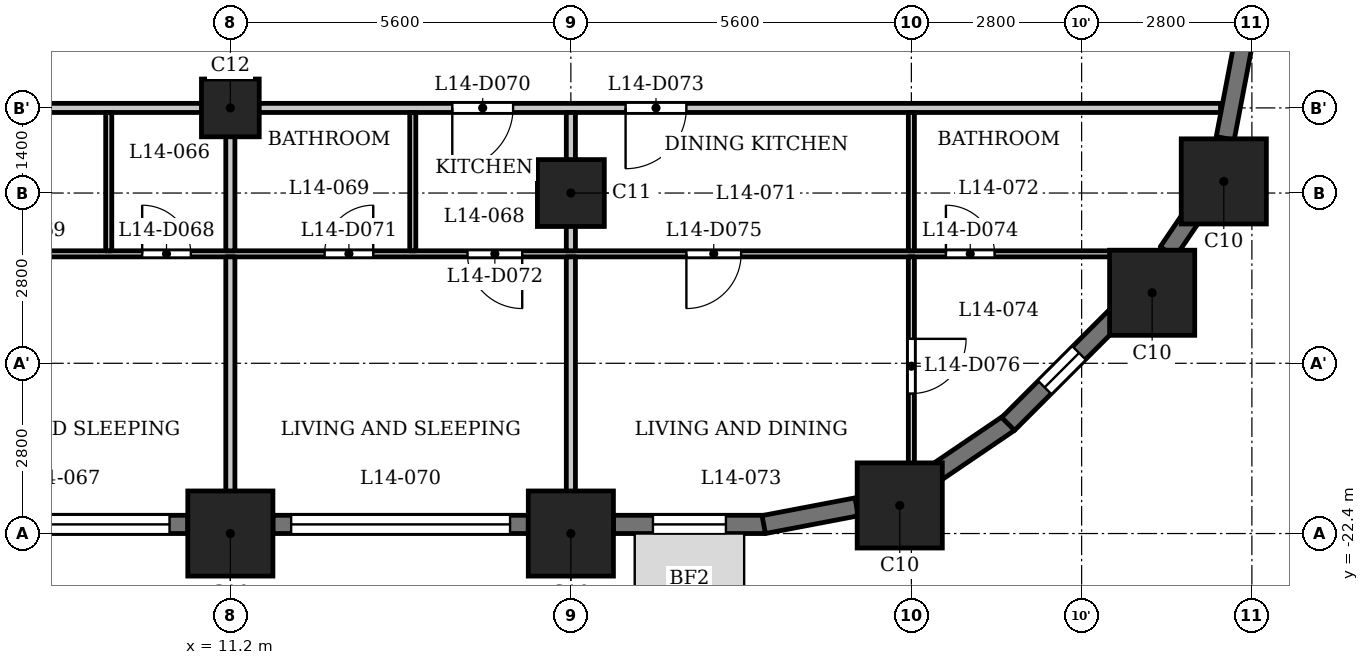
"""IFC4 building model, lengths in metres.
Left out: names, types, materials, properties, quantities, classifications, styles, units other than length and angle.
Written with IfcOpenShell. Run it as: python <this file> out.ifc"""

import sys

from ifc_helpers import new_model, si_unit, direction, frame, frame_2d, origin, origin_2d, place, context, subcontext, project, spatial, rectangle, extrude, element, fill, save


model = new_model("IFC4")
c1 = context("Model", 3, precision=1e-05, world=origin(), true_north=direction((0.0, 1.0)))
c2 = subcontext(c1, "Body", "Model", "MODEL_VIEW")
j1 = project(units=[si_unit("LENGTHUNIT", "METRE"), si_unit("PLANEANGLEUNIT", "RADIAN")], contexts=[c1])
p1 = place(None, origin())
s1 = spatial("IfcSite", under=j1, at=p1, CompositionType="ELEMENT")
p2 = place(p1, origin())
s2 = spatial("IfcBuilding", under=s1, at=p2, CompositionType="ELEMENT")
p3 = place(p2, frame((0.0, 0.0, 58.5)))
s3 = spatial("IfcBuildingStorey", under=s2, at=p3, CompositionType="ELEMENT", Elevation=58.5)
for number, where, z_axis, x_axis in (
    (1, (11.2, -22.4, 0.0), (0.0, 0.0, 1.0), (1.0, 0.0, 0.0)),
    (2, (16.8, -22.4, 0.0), (0.0, 0.0, 1.0), (1.0, 0.0, 0.0)),
    (3, (22.209, -21.938, 0.0), (0.0, 0.0, 1.0), (1.0, 0.0, 0.0)),
    (4, (26.36, -18.44, 0.0), (0.0, 0.0, 1.0), (1.0, 0.0, 0.0)),
    (5, (27.538, -16.609, 0.0), (0.0, 0.0, 1.0), (1.0, 0.0, 0.0)),
):
    element("IfcColumn", number, at=place(p3, frame(where, z_axis=z_axis, x_axis=x_axis)), inside=s3, PredefinedType="COLUMN", context=c2, shape_type="SweptSolid", body=[
        extrude(rectangle(XDim=1.4, YDim=1.4, at=origin_2d()), origin(), (0.0, 0.0, 1.0), 3.5),
    ])
p4 = place(p3, frame((16.8, -16.8, 0.0), z_axis=(0.0, 0.0, 1.0), x_axis=(1.0, 0.0, 0.0)))
e6 = element("IfcColumn", 6, at=p4, inside=s3, PredefinedType="COLUMN", context=c2, shape_type="SweptSolid", body=[
    extrude(rectangle(XDim=1.1, YDim=1.1, at=origin_2d()), origin(), (0.0, 0.0, 1.0), 3.5),
])
p5 = place(p3, frame((11.2, -15.4, 0.0), z_axis=(0.0, 0.0, 1.0), x_axis=(1.0, 0.0, 0.0)))
e7 = element("IfcColumn", 7, at=p5, inside=s3, PredefinedType="COLUMN", context=c2, shape_type="SweptSolid", body=[
    extrude(rectangle(XDim=0.95, YDim=0.95, at=origin_2d()), origin(), (0.0, 0.0, 1.0), 3.5),
])
p6 = place(p3, frame((6.3, -22.25, 0.0), z_axis=(0.0, 0.0, 1.0), x_axis=(1.0, 0.0, 0.0)))
e8 = element("IfcWall", 8, at=p6, inside=s3, PredefinedType="SOLIDWALL", context=c2, shape_type="SweptSolid", body=[
    extrude(rectangle(XDim=4.2, YDim=0.3, at=frame_2d((2.1, 0.0))), origin(), (0.0, 0.0, 1.0), 2.35),
])
p7 = place(p6, frame((0.3, 0.0, 1.2)))
e9 = element("IfcOpeningElement", 9, at=p7, cuts=e8, PredefinedType="OPENING", context=c2, shape_type="SweptSolid", body=[
    extrude(rectangle(XDim=3.6, YDim=0.95, at=frame_2d((1.8, 0.475))), frame((0.0, 0.16, 0.0), z_axis=(0.0, -1.0, 0.0), x_axis=(1.0, 0.0, 0.0)), (0.0, 0.0, 1.0), 0.32),
])
p8 = place(p3, frame((11.9, -22.25, 0.0), z_axis=(0.0, 0.0, 1.0), x_axis=(1.0, 0.0, 0.0)))
e10 = element("IfcWall", 10, at=p8, inside=s3, PredefinedType="SOLIDWALL", context=c2, shape_type="SweptSolid", body=[
    extrude(rectangle(XDim=4.2, YDim=0.3, at=frame_2d((2.1, 0.0))), origin(), (0.0, 0.0, 1.0), 2.35),
])
p9 = place(p8, frame((0.3, 0.0, 1.2)))
e11 = element("IfcOpeningElement", 11, at=p9, cuts=e10, PredefinedType="OPENING", context=c2, shape_type="SweptSolid", body=[
    extrude(rectangle(XDim=3.6, YDim=0.95, at=frame_2d((1.8, 0.475))), frame((0.0, 0.16, 0.0), z_axis=(0.0, -1.0, 0.0), x_axis=(1.0, 0.0, 0.0)), (0.0, 0.0, 1.0), 0.32),
])
p10 = place(p3, frame((17.5, -22.25, 0.0), z_axis=(0.0, 0.0, 1.0), x_axis=(1.0, 0.0, 0.0)))
e12 = element("IfcWall", 12, at=p10, inside=s3, PredefinedType="SOLIDWALL", context=c2, shape_type="SweptSolid", body=[
    extrude(rectangle(XDim=2.5, YDim=0.3, at=frame_2d((1.25, 0.0))), origin(), (0.0, 0.0, 1.0), 2.35),
])
p11 = place(p10, frame((0.65, 0.0, 0.6)))
e13 = element("IfcOpeningElement", 13, at=p11, cuts=e12, PredefinedType="OPENING", context=c2, shape_type="SweptSolid", body=[
    extrude(rectangle(XDim=1.2, YDim=1.55, at=frame_2d((0.6, 0.775))), frame((0.0, 0.16, 0.0), z_axis=(0.0, -1.0, 0.0), x_axis=(1.0, 0.0, 0.0)), (0.0, 0.0, 1.0), 0.32),
])
p12 = place(p3, frame((19.972, -22.253, 0.0), z_axis=(0.0, 0.0, 1.0), x_axis=(0.982297345734, 0.187328386968, 0.0)))
e14 = element("IfcWall", 14, at=p12, inside=s3, PredefinedType="SOLIDWALL", context=c2, shape_type="SweptSolid", body=[
    extrude(rectangle(XDim=1.556, YDim=0.3, at=frame_2d((0.778, 0.0))), origin(), (0.0, 0.0, 1.0), 2.35),
])
p13 = place(p3, frame((22.726, -21.454, 0.0), z_axis=(0.0, 0.0, 1.0), x_axis=(0.827019875346, 0.562172683241, 0.0)))
e15 = element("IfcWall", 15, at=p13, inside=s3, PredefinedType="SOLIDWALL", context=c2, shape_type="SweptSolid", body=[
    extrude(rectangle(XDim=1.556, YDim=0.3, at=frame_2d((0.778, 0.0))), origin(), (0.0, 0.0, 1.0), 2.35),
])
p14 = place(p3, frame((23.991, -20.597, 0.0), z_axis=(0.0, 0.0, 1.0), x_axis=(0.707106781187, 0.707106781187, 0.0)))
e16 = element("IfcWall", 16, at=p14, inside=s3, PredefinedType="SOLIDWALL", context=c2, shape_type="SweptSolid", body=[
    extrude(rectangle(XDim=2.5, YDim=0.3, at=frame_2d((1.25, 0.0))), origin(), (0.0, 0.0, 1.0), 2.35),
])
p15 = place(p14, frame((0.85, 0.0, 0.6)))
e17 = element("IfcOpeningElement", 17, at=p15, cuts=e16, PredefinedType="OPENING", context=c2, shape_type="SweptSolid", body=[
    extrude(rectangle(XDim=0.8, YDim=1.55, at=frame_2d((0.4, 0.775))), frame((0.0, 0.16, 0.0), z_axis=(0.0, -1.0, 0.0), x_axis=(1.0, 0.0, 0.0)), (0.0, 0.0, 1.0), 0.32),
])
p16 = place(p3, frame((26.617, -17.769, 0.0), z_axis=(0.0, 0.0, 1.0), x_axis=(0.562000651531, 0.827136788977, 0.0)))
e18 = element("IfcWall", 18, at=p16, inside=s3, PredefinedType="SOLIDWALL", context=c2, shape_type="SweptSolid", body=[
    extrude(rectangle(XDim=0.777, YDim=0.3, at=frame_2d((0.389, 0.0))), origin(), (0.0, 0.0, 1.0), 3.2),
])
p17 = place(p3, frame((27.561, -15.9, 0.0), z_axis=(0.0, 0.0, 1.0), x_axis=(0.187328386968, 0.982297345734, 0.0)))
e19 = element("IfcWall", 19, at=p17, inside=s3, PredefinedType="SOLIDWALL", context=c2, shape_type="SweptSolid", body=[
    extrude(rectangle(XDim=1.556, YDim=0.3, at=frame_2d((0.778, 0.0))), origin(), (0.0, 0.0, 1.0), 2.35),
])
p18 = place(p3, frame((-26.394, -17.8, 0.0), z_axis=(0.0, 0.0, 1.0), x_axis=(1.0, 0.0, 0.0)))
e20 = element("IfcWall", 20, at=p18, inside=s3, PredefinedType="PARTITIONING", context=c2, shape_type="SweptSolid", body=[
    extrude(rectangle(XDim=53.034, YDim=0.1, at=frame_2d((26.517, 0.0))), origin(), (0.0, 0.0, 1.0), 3.2),
])
p19 = place(p18, frame((0.794, 0.0, 0.0)))
e21 = element("IfcOpeningElement", 21, at=p19, cuts=e20, PredefinedType="OPENING", context=c2, shape_type="SweptSolid", body=[
    extrude(rectangle(XDim=0.8, YDim=2.1, at=frame_2d((0.4, 1.05))), frame((0.0, 0.06, 0.0), z_axis=(0.0, -1.0, 0.0), x_axis=(1.0, 0.0, 0.0)), (0.0, 0.0, 1.0), 0.12),
])
p20 = place(p18, frame((5.644, 0.0, 0.0)))
e22 = element("IfcOpeningElement", 22, at=p20, cuts=e20, PredefinedType="OPENING", context=c2, shape_type="SweptSolid", body=[
    extrude(rectangle(XDim=0.9, YDim=2.1, at=frame_2d((0.45, 1.05))), frame((0.0, 0.06, 0.0), z_axis=(0.0, -1.0, 0.0), x_axis=(1.0, 0.0, 0.0)), (0.0, 0.0, 1.0), 0.12),
])
p21 = place(p18, frame((19.344, 0.0, 0.0)))
e23 = element("IfcOpeningElement", 23, at=p21, cuts=e20, PredefinedType="OPENING", context=c2, shape_type="SweptSolid", body=[
    extrude(rectangle(XDim=0.8, YDim=2.1, at=frame_2d((0.4, 1.05))), frame((0.0, 0.06, 0.0), z_axis=(0.0, -1.0, 0.0), x_axis=(1.0, 0.0, 0.0)), (0.0, 0.0, 1.0), 0.12),
])
p22 = place(p18, frame((17.094, 0.0, 0.0)))
e24 = element("IfcOpeningElement", 24, at=p22, cuts=e20, PredefinedType="OPENING", context=c2, shape_type="SweptSolid", body=[
    extrude(rectangle(XDim=0.9, YDim=2.1, at=frame_2d((0.45, 1.05))), frame((0.0, 0.06, 0.0), z_axis=(0.0, -1.0, 0.0), x_axis=(1.0, 0.0, 0.0)), (0.0, 0.0, 1.0), 0.12),
])
p23 = place(p18, frame((10.494, 0.0, 0.0)))
e25 = element("IfcOpeningElement", 25, at=p23, cuts=e20, PredefinedType="OPENING", context=c2, shape_type="SweptSolid", body=[
    extrude(rectangle(XDim=0.9, YDim=2.1, at=frame_2d((0.45, 1.05))), frame((0.0, 0.06, 0.0), z_axis=(0.0, -1.0, 0.0), x_axis=(1.0, 0.0, 0.0)), (0.0, 0.0, 1.0), 0.12),
])
p24 = place(p18, frame((13.294, 0.0, 0.0)))
e26 = element("IfcOpeningElement", 26, at=p24, cuts=e20, PredefinedType="OPENING", context=c2, shape_type="SweptSolid", body=[
    extrude(rectangle(XDim=0.9, YDim=2.1, at=frame_2d((0.45, 1.05))), frame((0.0, 0.06, 0.0), z_axis=(0.0, -1.0, 0.0), x_axis=(1.0, 0.0, 0.0)), (0.0, 0.0, 1.0), 0.12),
])
p25 = place(p18, frame((27.044, 0.0, 0.0)))
e27 = element("IfcOpeningElement", 27, at=p25, cuts=e20, PredefinedType="OPENING", context=c2, shape_type="SweptSolid", body=[
    extrude(rectangle(XDim=0.8, YDim=2.1, at=frame_2d((0.4, 1.05))), frame((0.0, 0.06, 0.0), z_axis=(0.0, -1.0, 0.0), x_axis=(1.0, 0.0, 0.0)), (0.0, 0.0, 1.0), 0.12),
])
p26 = place(p18, frame((22.444, 0.0, 0.0)))
e28 = element("IfcOpeningElement", 28, at=p26, cuts=e20, PredefinedType="OPENING", context=c2, shape_type="SweptSolid", body=[
    extrude(rectangle(XDim=0.9, YDim=2.1, at=frame_2d((0.45, 1.05))), frame((0.0, 0.06, 0.0), z_axis=(0.0, -1.0, 0.0), x_axis=(1.0, 0.0, 0.0)), (0.0, 0.0, 1.0), 0.12),
])
p27 = place(p18, frame((36.144, 0.0, 0.0)))
e29 = element("IfcOpeningElement", 29, at=p27, cuts=e20, PredefinedType="OPENING", context=c2, shape_type="SweptSolid", body=[
    extrude(rectangle(XDim=0.8, YDim=2.1, at=frame_2d((0.4, 1.05))), frame((0.0, 0.06, 0.0), z_axis=(0.0, -1.0, 0.0), x_axis=(1.0, 0.0, 0.0)), (0.0, 0.0, 1.0), 0.12),
])
p28 = place(p18, frame((33.644, 0.0, 0.0)))
e30 = element("IfcOpeningElement", 30, at=p28, cuts=e20, PredefinedType="OPENING", context=c2, shape_type="SweptSolid", body=[
    extrude(rectangle(XDim=0.9, YDim=2.1, at=frame_2d((0.45, 1.05))), frame((0.0, 0.06, 0.0), z_axis=(0.0, -1.0, 0.0), x_axis=(1.0, 0.0, 0.0)), (0.0, 0.0, 1.0), 0.12),
])
p29 = place(p18, frame((39.144, 0.0, 0.0)))
e31 = element("IfcOpeningElement", 31, at=p29, cuts=e20, PredefinedType="OPENING", context=c2, shape_type="SweptSolid", body=[
    extrude(rectangle(XDim=0.8, YDim=2.1, at=frame_2d((0.4, 1.05))), frame((0.0, 0.06, 0.0), z_axis=(0.0, -1.0, 0.0), x_axis=(1.0, 0.0, 0.0)), (0.0, 0.0, 1.0), 0.12),
])
p30 = place(p18, frame((41.494, 0.0, 0.0)))
e32 = element("IfcOpeningElement", 32, at=p30, cuts=e20, PredefinedType="OPENING", context=c2, shape_type="SweptSolid", body=[
    extrude(rectangle(XDim=0.9, YDim=2.1, at=frame_2d((0.45, 1.05))), frame((0.0, 0.06, 0.0), z_axis=(0.0, -1.0, 0.0), x_axis=(1.0, 0.0, 0.0)), (0.0, 0.0, 1.0), 0.12),
])
p31 = place(p18, frame((49.362, 0.0, 0.0)))
e33 = element("IfcOpeningElement", 33, at=p31, cuts=e20, PredefinedType="OPENING", context=c2, shape_type="SweptSolid", body=[
    extrude(rectangle(XDim=0.8, YDim=2.1, at=frame_2d((0.4, 1.05))), frame((0.0, 0.06, 0.0), z_axis=(0.0, -1.0, 0.0), x_axis=(1.0, 0.0, 0.0)), (0.0, 0.0, 1.0), 0.12),
])
p32 = place(p18, frame((45.094, 0.0, 0.0)))
e34 = element("IfcOpeningElement", 34, at=p32, cuts=e20, PredefinedType="OPENING", context=c2, shape_type="SweptSolid", body=[
    extrude(rectangle(XDim=0.9, YDim=2.1, at=frame_2d((0.45, 1.05))), frame((0.0, 0.06, 0.0), z_axis=(0.0, -1.0, 0.0), x_axis=(1.0, 0.0, 0.0)), (0.0, 0.0, 1.0), 0.12),
])
p33 = place(p3, frame((-27.484, -15.4, 0.0), z_axis=(0.0, 0.0, 1.0), x_axis=(1.0, 0.0, 0.0)))
e35 = element("IfcWall", 35, at=p33, inside=s3, PredefinedType="PARTITIONING", context=c2, shape_type="SweptSolid", body=[
    extrude(rectangle(XDim=54.968, YDim=0.15, at=frame_2d((27.484, 0.0))), origin(), (0.0, 0.0, 1.0), 3.2),
])
p34 = place(p33, frame((5.734, 0.0, 0.0)))
e36 = element("IfcOpeningElement", 36, at=p34, cuts=e35, PredefinedType="OPENING", context=c2, shape_type="SweptSolid", body=[
    extrude(rectangle(XDim=1.0, YDim=2.1, at=frame_2d((0.5, 1.05))), frame((0.0, 0.085, 0.0), z_axis=(0.0, -1.0, 0.0), x_axis=(1.0, 0.0, 0.0)), (0.0, 0.0, 1.0), 0.17),
])
p35 = place(p33, frame((11.584, 0.0, 0.0)))
e37 = element("IfcOpeningElement", 37, at=p35, cuts=e35, PredefinedType="OPENING", context=c2, shape_type="SweptSolid", body=[
    extrude(rectangle(XDim=1.0, YDim=2.1, at=frame_2d((0.5, 1.05))), frame((0.0, 0.085, 0.0), z_axis=(0.0, -1.0, 0.0), x_axis=(1.0, 0.0, 0.0)), (0.0, 0.0, 1.0), 0.17),
])
p36 = place(p33, frame((22.534, 0.0, 0.0)))
e38 = element("IfcOpeningElement", 38, at=p36, cuts=e35, PredefinedType="OPENING", context=c2, shape_type="SweptSolid", body=[
    extrude(rectangle(XDim=1.0, YDim=2.1, at=frame_2d((0.5, 1.05))), frame((0.0, 0.085, 0.0), z_axis=(0.0, -1.0, 0.0), x_axis=(1.0, 0.0, 0.0)), (0.0, 0.0, 1.0), 0.17),
])
p37 = place(p33, frame((33.734, 0.0, 0.0)))
e39 = element("IfcOpeningElement", 39, at=p37, cuts=e35, PredefinedType="OPENING", context=c2, shape_type="SweptSolid", body=[
    extrude(rectangle(XDim=1.0, YDim=2.1, at=frame_2d((0.5, 1.05))), frame((0.0, 0.085, 0.0), z_axis=(0.0, -1.0, 0.0), x_axis=(1.0, 0.0, 0.0)), (0.0, 0.0, 1.0), 0.17),
])
p38 = place(p33, frame((42.334, 0.0, 0.0)))
e40 = element("IfcOpeningElement", 40, at=p38, cuts=e35, PredefinedType="OPENING", context=c2, shape_type="SweptSolid", body=[
    extrude(rectangle(XDim=1.0, YDim=2.1, at=frame_2d((0.5, 1.05))), frame((0.0, 0.085, 0.0), z_axis=(0.0, -1.0, 0.0), x_axis=(1.0, 0.0, 0.0)), (0.0, 0.0, 1.0), 0.17),
])
p39 = place(p33, frame((45.184, 0.0, 0.0)))
e41 = element("IfcOpeningElement", 41, at=p39, cuts=e35, PredefinedType="OPENING", context=c2, shape_type="SweptSolid", body=[
    extrude(rectangle(XDim=1.0, YDim=2.1, at=frame_2d((0.5, 1.05))), frame((0.0, 0.085, 0.0), z_axis=(0.0, -1.0, 0.0), x_axis=(1.0, 0.0, 0.0)), (0.0, 0.0, 1.0), 0.17),
])
p40 = place(p3, frame((9.2, -17.75, 0.0), z_axis=(0.0, 0.0, 1.0), x_axis=(0.0, 1.0, 0.0)))
e42 = element("IfcWall", 42, at=p40, inside=s3, PredefinedType="PARTITIONING", context=c2, shape_type="SweptSolid", body=[
    extrude(rectangle(XDim=2.275, YDim=0.1, at=frame_2d((1.137, 0.0))), origin(), (0.0, 0.0, 1.0), 3.2),
])
p41 = place(p3, frame((11.2, -23.08, 0.0), z_axis=(0.0, 0.0, 1.0), x_axis=(0.0, 1.0, 0.0)))
e43 = element("IfcWall", 43, at=p41, inside=s3, PredefinedType="PARTITIONING", context=c2, shape_type="SweptSolid", body=[
    extrude(rectangle(XDim=5.23, YDim=0.15, at=frame_2d((2.615, 0.0))), origin(), (0.0, 0.0, 1.0), 3.2),
])
p42 = place(p3, frame((11.2, -17.75, 0.0), z_axis=(0.0, 0.0, 1.0), x_axis=(0.0, 1.0, 0.0)))
e44 = element("IfcWall", 44, at=p42, inside=s3, PredefinedType="PARTITIONING", context=c2, shape_type="SweptSolid", body=[
    extrude(rectangle(XDim=2.275, YDim=0.15, at=frame_2d((1.137, 0.0))), origin(), (0.0, 0.0, 1.0), 3.2),
])
p43 = place(p3, frame((14.2, -17.75, 0.0), z_axis=(0.0, 0.0, 1.0), x_axis=(0.0, 1.0, 0.0)))
e45 = element("IfcWall", 45, at=p43, inside=s3, PredefinedType="PARTITIONING", context=c2, shape_type="SweptSolid", body=[
    extrude(rectangle(XDim=2.275, YDim=0.1, at=frame_2d((1.137, 0.0))), origin(), (0.0, 0.0, 1.0), 3.2),
])
p44 = place(p3, frame((16.8, -23.08, 0.0), z_axis=(0.0, 0.0, 1.0), x_axis=(0.0, 1.0, 0.0)))
e46 = element("IfcWall", 46, at=p44, inside=s3, PredefinedType="PARTITIONING", context=c2, shape_type="SweptSolid", body=[
    extrude(rectangle(XDim=5.23, YDim=0.15, at=frame_2d((2.615, 0.0))), origin(), (0.0, 0.0, 1.0), 3.2),
])
p45 = place(p3, frame((16.8, -17.75, 0.0), z_axis=(0.0, 0.0, 1.0), x_axis=(0.0, 1.0, 0.0)))
e47 = element("IfcWall", 47, at=p45, inside=s3, PredefinedType="PARTITIONING", context=c2, shape_type="SweptSolid", body=[
    extrude(rectangle(XDim=2.275, YDim=0.15, at=frame_2d((1.137, 0.0))), origin(), (0.0, 0.0, 1.0), 3.2),
])
p46 = place(p3, frame((22.4, -21.72, 0.0), z_axis=(0.0, 0.0, 1.0), x_axis=(0.0, 1.0, 0.0)))
e48 = element("IfcWall", 48, at=p46, inside=s3, PredefinedType="PARTITIONING", context=c2, shape_type="SweptSolid", body=[
    extrude(rectangle(XDim=3.87, YDim=0.1, at=frame_2d((1.935, 0.0))), origin(), (0.0, 0.0, 1.0), 3.2),
])
p47 = place(p46, frame((1.622, 0.0, 0.0)))
e49 = element("IfcOpeningElement", 49, at=p47, cuts=e48, PredefinedType="OPENING", context=c2, shape_type="SweptSolid", body=[
    extrude(rectangle(XDim=0.9, YDim=2.1, at=frame_2d((0.45, 1.05))), frame((0.0, 0.06, 0.0), z_axis=(0.0, -1.0, 0.0), x_axis=(1.0, 0.0, 0.0)), (0.0, 0.0, 1.0), 0.12),
])
p48 = place(p3, frame((22.4, -17.75, 0.0), z_axis=(0.0, 0.0, 1.0), x_axis=(0.0, 1.0, 0.0)))
e50 = element("IfcWall", 50, at=p48, inside=s3, PredefinedType="PARTITIONING", context=c2, shape_type="SweptSolid", body=[
    extrude(rectangle(XDim=2.275, YDim=0.1, at=frame_2d((1.137, 0.0))), origin(), (0.0, 0.0, 1.0), 3.2),
])
p49 = place(p27, origin())
e51 = element("IfcDoor", 51, at=p49, inside=s3, OperationType="SINGLE_SWING_RIGHT", PredefinedType="DOOR", context=c2, shape_type="SweptSolid", body=[
    extrude(rectangle(XDim=0.8, YDim=2.1, at=frame_2d((0.4, 1.05))), frame((0.0, 0.025, 0.0), z_axis=(0.0, -1.0, 0.0), x_axis=(1.0, 0.0, 0.0)), (0.0, 0.0, 1.0), 0.05),
])
fill(e29, e51)
p50 = place(p38, origin())
e52 = element("IfcDoor", 52, at=p50, inside=s3, OperationType="SINGLE_SWING_LEFT", PredefinedType="DOOR", context=c2, shape_type="SweptSolid", body=[
    extrude(rectangle(XDim=1.0, YDim=2.1, at=frame_2d((0.5, 1.05))), frame((0.0, 0.025, 0.0), z_axis=(0.0, -1.0, 0.0), x_axis=(1.0, 0.0, 0.0)), (0.0, 0.0, 1.0), 0.05),
])
fill(e40, e52)
p51 = place(p29, origin())
e53 = element("IfcDoor", 53, at=p51, inside=s3, OperationType="SINGLE_SWING_LEFT", PredefinedType="DOOR", context=c2, shape_type="SweptSolid", body=[
    extrude(rectangle(XDim=0.8, YDim=2.1, at=frame_2d((0.4, 1.05))), frame((0.0, 0.025, 0.0), z_axis=(0.0, -1.0, 0.0), x_axis=(1.0, 0.0, 0.0)), (0.0, 0.0, 1.0), 0.05),
])
fill(e31, e53)
p52 = place(p30, origin())
e54 = element("IfcDoor", 54, at=p52, inside=s3, OperationType="SINGLE_SWING_RIGHT", PredefinedType="DOOR", context=c2, shape_type="SweptSolid", body=[
    extrude(rectangle(XDim=0.9, YDim=2.1, at=frame_2d((0.45, 1.05))), frame((0.0, 0.025, 0.0), z_axis=(0.0, -1.0, 0.0), x_axis=(1.0, 0.0, 0.0)), (0.0, 0.0, 1.0), 0.05),
])
fill(e32, e54)
p53 = place(p39, origin())
e55 = element("IfcDoor", 55, at=p53, inside=s3, OperationType="SINGLE_SWING_LEFT", PredefinedType="DOOR", context=c2, shape_type="SweptSolid", body=[
    extrude(rectangle(XDim=1.0, YDim=2.1, at=frame_2d((0.5, 1.05))), frame((0.0, 0.025, 0.0), z_axis=(0.0, -1.0, 0.0), x_axis=(1.0, 0.0, 0.0)), (0.0, 0.0, 1.0), 0.05),
])
fill(e41, e55)
p54 = place(p31, origin())
e56 = element("IfcDoor", 56, at=p54, inside=s3, OperationType="SINGLE_SWING_RIGHT", PredefinedType="DOOR", context=c2, shape_type="SweptSolid", body=[
    extrude(rectangle(XDim=0.8, YDim=2.1, at=frame_2d((0.4, 1.05))), frame((0.0, 0.025, 0.0), z_axis=(0.0, -1.0, 0.0), x_axis=(1.0, 0.0, 0.0)), (0.0, 0.0, 1.0), 0.05),
])
fill(e33, e56)
p55 = place(p32, origin())
e57 = element("IfcDoor", 57, at=p55, inside=s3, OperationType="SINGLE_SWING_LEFT", PredefinedType="DOOR", context=c2, shape_type="SweptSolid", body=[
    extrude(rectangle(XDim=0.9, YDim=2.1, at=frame_2d((0.45, 1.05))), frame((0.0, 0.025, 0.0), z_axis=(0.0, -1.0, 0.0), x_axis=(1.0, 0.0, 0.0)), (0.0, 0.0, 1.0), 0.05),
])
fill(e34, e57)
p56 = place(p47, origin())
e58 = element("IfcDoor", 58, at=p56, inside=s3, OperationType="SINGLE_SWING_RIGHT", PredefinedType="DOOR", context=c2, shape_type="SweptSolid", body=[
    extrude(rectangle(XDim=0.9, YDim=2.1, at=frame_2d((0.45, 1.05))), frame((0.0, 0.025, 0.0), z_axis=(0.0, -1.0, 0.0), x_axis=(1.0, 0.0, 0.0)), (0.0, 0.0, 1.0), 0.05),
])
fill(e49, e58)
p57 = place(p7, origin())
e59 = element("IfcWindow", 59, at=p57, inside=s3, PartitioningType="SINGLE_PANEL", PredefinedType="WINDOW", context=c2, shape_type="SweptSolid", body=[
    extrude(rectangle(XDim=3.6, YDim=0.95, at=frame_2d((1.8, 0.475))), frame((0.0, 0.03, 0.0), z_axis=(0.0, -1.0, 0.0), x_axis=(1.0, 0.0, 0.0)), (0.0, 0.0, 1.0), 0.06),
])
fill(e9, e59)
p58 = place(p9, origin())
e60 = element("IfcWindow", 60, at=p58, inside=s3, PartitioningType="SINGLE_PANEL", PredefinedType="WINDOW", context=c2, shape_type="SweptSolid", body=[
    extrude(rectangle(XDim=3.6, YDim=0.95, at=frame_2d((1.8, 0.475))), frame((0.0, 0.03, 0.0), z_axis=(0.0, -1.0, 0.0), x_axis=(1.0, 0.0, 0.0)), (0.0, 0.0, 1.0), 0.06),
])
fill(e11, e60)
p59 = place(p11, origin())
e61 = element("IfcWindow", 61, at=p59, inside=s3, PartitioningType="SINGLE_PANEL", PredefinedType="WINDOW", context=c2, shape_type="SweptSolid", body=[
    extrude(rectangle(XDim=1.2, YDim=1.55, at=frame_2d((0.6, 0.775))), frame((0.0, 0.03, 0.0), z_axis=(0.0, -1.0, 0.0), x_axis=(1.0, 0.0, 0.0)), (0.0, 0.0, 1.0), 0.06),
])
fill(e13, e61)
p60 = place(p15, origin())
e62 = element("IfcWindow", 62, at=p60, inside=s3, PartitioningType="SINGLE_PANEL", PredefinedType="WINDOW", context=c2, shape_type="SweptSolid", body=[
    extrude(rectangle(XDim=0.8, YDim=1.55, at=frame_2d((0.4, 0.775))), frame((0.0, 0.03, 0.0), z_axis=(0.0, -1.0, 0.0), x_axis=(1.0, 0.0, 0.0)), (0.0, 0.0, 1.0), 0.06),
])
fill(e17, e62)
save(model, sys.argv[1])
